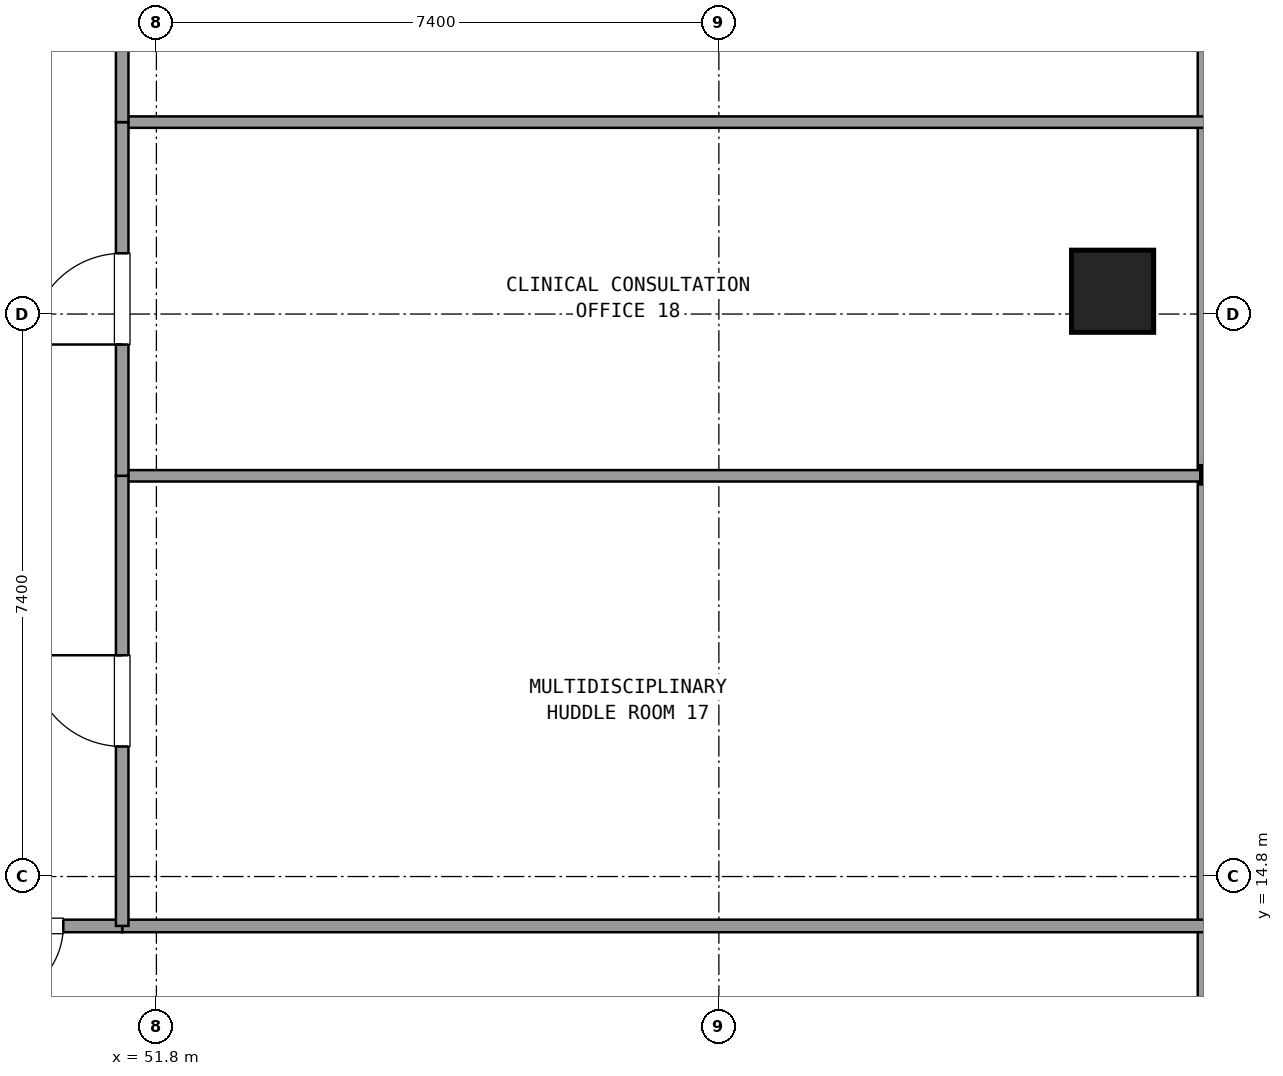
"""IFC4 building model, lengths in metres.
Left out: names, types, materials, properties, quantities, classifications, styles, units other than length and angle.
Written with IfcOpenShell. Run it as: python <this file> out.ifc"""

import sys

from ifc_helpers import new_model, si_unit, direction, frame, frame_2d, origin, origin_2d, place, context, subcontext, project, spatial, rectangle, extrude, element, fill, save


model = new_model("IFC4")
c1 = context("Model", 3, precision=1e-05, world=origin(), true_north=direction((0.0, 1.0)))
c2 = subcontext(c1, "Body", "Model", "MODEL_VIEW")
j1 = project(units=[si_unit("LENGTHUNIT", "METRE"), si_unit("PLANEANGLEUNIT", "RADIAN")], contexts=[c1])
p1 = place(None, origin())
s1 = spatial("IfcSite", under=j1, at=p1, CompositionType="ELEMENT")
p2 = place(p1, origin())
s2 = spatial("IfcBuilding", under=s1, at=p2, CompositionType="ELEMENT")
p3 = place(p2, frame((0.0, 0.0, 38.34)))
s3 = spatial("IfcBuildingStorey", under=s2, at=p3, CompositionType="ELEMENT", Elevation=38.34)
p4 = place(p3, frame((64.38, 22.5, 0.0), z_axis=(0.0, 0.0, 1.0), x_axis=(1.0, 0.0, 0.0)))
e1 = element("IfcColumn", 1, at=p4, inside=s3, PredefinedType="COLUMN", context=c2, shape_type="SweptSolid", body=[
    extrude(rectangle(XDim=1.08, YDim=1.08, at=origin_2d()), origin(), (0.0, 0.0, 1.0), 3.6),
])
p5 = place(p3, frame((65.62, 8.455, 0.0), z_axis=(0.0, 0.0, 1.0), x_axis=(0.0, 1.0, 0.0)))
e2 = element("IfcWall", 2, at=p5, inside=s3, PredefinedType="SOLIDWALL", context=c2, shape_type="SweptSolid", body=[
    extrude(rectangle(XDim=34.89, YDim=0.24, at=frame_2d((17.445, 0.0))), origin(), (0.0, 0.0, 1.0), 0.85),
])
p6 = place(p3, frame((51.35, 14.15, 0.0), z_axis=(0.0, 0.0, 1.0), x_axis=(1.0, 0.0, 0.0)))
e3 = element("IfcWall", 3, at=p6, inside=s3, PredefinedType="PARTITIONING", context=c2, shape_type="SweptSolid", body=[
    extrude(rectangle(XDim=14.25, YDim=0.165, at=frame_2d((7.125, 0.0))), origin(), (0.0, 0.0, 1.0), 2.61),
])
p7 = place(p3, frame((48.8, 14.15, 0.0), z_axis=(0.0, 0.0, 1.0), x_axis=(1.0, 0.0, 0.0)))
e4 = element("IfcWall", 4, at=p7, inside=s3, PredefinedType="PARTITIONING", context=c2, shape_type="SweptSolid", body=[
    extrude(rectangle(XDim=2.55, YDim=0.165, at=frame_2d((1.275, 0.0))), origin(), (0.0, 0.0, 1.0), 2.61),
])
p8 = place(p7, frame((0.775, 0.0, 0.0)))
e5 = element("IfcOpeningElement", 5, at=p8, cuts=e4, PredefinedType="OPENING", context=c2, shape_type="SweptSolid", body=[
    extrude(rectangle(XDim=1.0, YDim=2.15, at=frame_2d((0.5, 1.075))), frame((0.0, 0.093, 0.0), z_axis=(0.0, -1.0, 0.0), x_axis=(1.0, 0.0, 0.0)), (0.0, 0.0, 1.0), 0.185),
])
p9 = place(p3, frame((51.35, 20.072, 0.0), z_axis=(0.0, 0.0, 1.0), x_axis=(1.0, 0.0, 0.0)))
e6 = element("IfcWall", 6, at=p9, inside=s3, PredefinedType="PARTITIONING", context=c2, shape_type="SweptSolid", body=[
    extrude(rectangle(XDim=14.25, YDim=0.15, at=frame_2d((7.125, 0.0))), origin(), (0.0, 0.0, 1.0), 2.61),
])
p10 = place(p3, frame((51.35, 14.15, 0.0), z_axis=(0.0, 0.0, 1.0), x_axis=(0.0, 1.0, 0.0)))
e7 = element("IfcWall", 7, at=p10, inside=s3, PredefinedType="PARTITIONING", context=c2, shape_type="SweptSolid", body=[
    extrude(rectangle(XDim=5.922, YDim=0.165, at=frame_2d((2.961, 0.0))), origin(), (0.0, 0.0, 1.0), 2.61),
])
p11 = place(p10, frame((2.361, 0.0, 0.0)))
e8 = element("IfcOpeningElement", 8, at=p11, cuts=e7, PredefinedType="OPENING", context=c2, shape_type="SweptSolid", body=[
    extrude(rectangle(XDim=1.2, YDim=2.15, at=frame_2d((0.6, 1.075))), frame((0.0, 0.093, 0.0), z_axis=(0.0, -1.0, 0.0), x_axis=(1.0, 0.0, 0.0)), (0.0, 0.0, 1.0), 0.185),
])
p12 = place(p3, frame((51.35, 24.725, 0.0), z_axis=(0.0, 0.0, 1.0), x_axis=(1.0, 0.0, 0.0)))
e9 = element("IfcWall", 9, at=p12, inside=s3, PredefinedType="PARTITIONING", context=c2, shape_type="SweptSolid", body=[
    extrude(rectangle(XDim=14.25, YDim=0.15, at=frame_2d((7.125, 0.0))), origin(), (0.0, 0.0, 1.0), 2.61),
])
p13 = place(p3, frame((51.35, 20.072, 0.0), z_axis=(0.0, 0.0, 1.0), x_axis=(0.0, 1.0, 0.0)))
e10 = element("IfcWall", 10, at=p13, inside=s3, PredefinedType="PARTITIONING", context=c2, shape_type="SweptSolid", body=[
    extrude(rectangle(XDim=4.653, YDim=0.165, at=frame_2d((2.327, 0.0))), origin(), (0.0, 0.0, 1.0), 2.61),
])
p14 = place(p13, frame((1.727, 0.0, 0.0)))
e11 = element("IfcOpeningElement", 11, at=p14, cuts=e10, PredefinedType="OPENING", context=c2, shape_type="SweptSolid", body=[
    extrude(rectangle(XDim=1.2, YDim=2.15, at=frame_2d((0.6, 1.075))), frame((0.0, 0.093, 0.0), z_axis=(0.0, -1.0, 0.0), x_axis=(1.0, 0.0, 0.0)), (0.0, 0.0, 1.0), 0.185),
])
p15 = place(p3, frame((51.35, 24.725, 0.0), z_axis=(0.0, 0.0, 1.0), x_axis=(0.0, 1.0, 0.0)))
e12 = element("IfcWall", 12, at=p15, inside=s3, PredefinedType="PARTITIONING", context=c2, shape_type="SweptSolid", body=[
    extrude(rectangle(XDim=7.238, YDim=0.165, at=frame_2d((3.619, 0.0))), origin(), (0.0, 0.0, 1.0), 2.61),
])
p16 = place(p15, frame((3.019, 0.0, 0.0)))
e13 = element("IfcOpeningElement", 13, at=p16, cuts=e12, PredefinedType="OPENING", context=c2, shape_type="SweptSolid", body=[
    extrude(rectangle(XDim=1.2, YDim=2.15, at=frame_2d((0.6, 1.075))), frame((0.0, 0.093, 0.0), z_axis=(0.0, -1.0, 0.0), x_axis=(1.0, 0.0, 0.0)), (0.0, 0.0, 1.0), 0.185),
])
p17 = place(p8, frame((1.0, 0.0, 0.0), z_axis=(0.0, 0.0, 1.0), x_axis=(-1.0, 0.0, 0.0)))
e14 = element("IfcDoor", 14, at=p17, inside=s3, OperationType="SINGLE_SWING_LEFT", PredefinedType="DOOR", context=c2, shape_type="SweptSolid", body=[
    extrude(rectangle(XDim=1.0, YDim=2.15, at=frame_2d((0.5, 1.075))), frame((0.0, 0.025, 0.0), z_axis=(0.0, -1.0, 0.0), x_axis=(1.0, 0.0, 0.0)), (0.0, 0.0, 1.0), 0.05),
])
fill(e5, e14)
p18 = place(p11, origin())
e15 = element("IfcDoor", 15, at=p18, inside=s3, OperationType="SINGLE_SWING_RIGHT", PredefinedType="DOOR", context=c2, shape_type="SweptSolid", body=[
    extrude(rectangle(XDim=1.2, YDim=2.15, at=frame_2d((0.6, 1.075))), frame((0.0, 0.025, 0.0), z_axis=(0.0, -1.0, 0.0), x_axis=(1.0, 0.0, 0.0)), (0.0, 0.0, 1.0), 0.05),
])
fill(e8, e15)
p19 = place(p14, origin())
e16 = element("IfcDoor", 16, at=p19, inside=s3, OperationType="SINGLE_SWING_LEFT", PredefinedType="DOOR", context=c2, shape_type="SweptSolid", body=[
    extrude(rectangle(XDim=1.2, YDim=2.15, at=frame_2d((0.6, 1.075))), frame((0.0, 0.025, 0.0), z_axis=(0.0, -1.0, 0.0), x_axis=(1.0, 0.0, 0.0)), (0.0, 0.0, 1.0), 0.05),
])
fill(e11, e16)
save(model, sys.argv[1])
